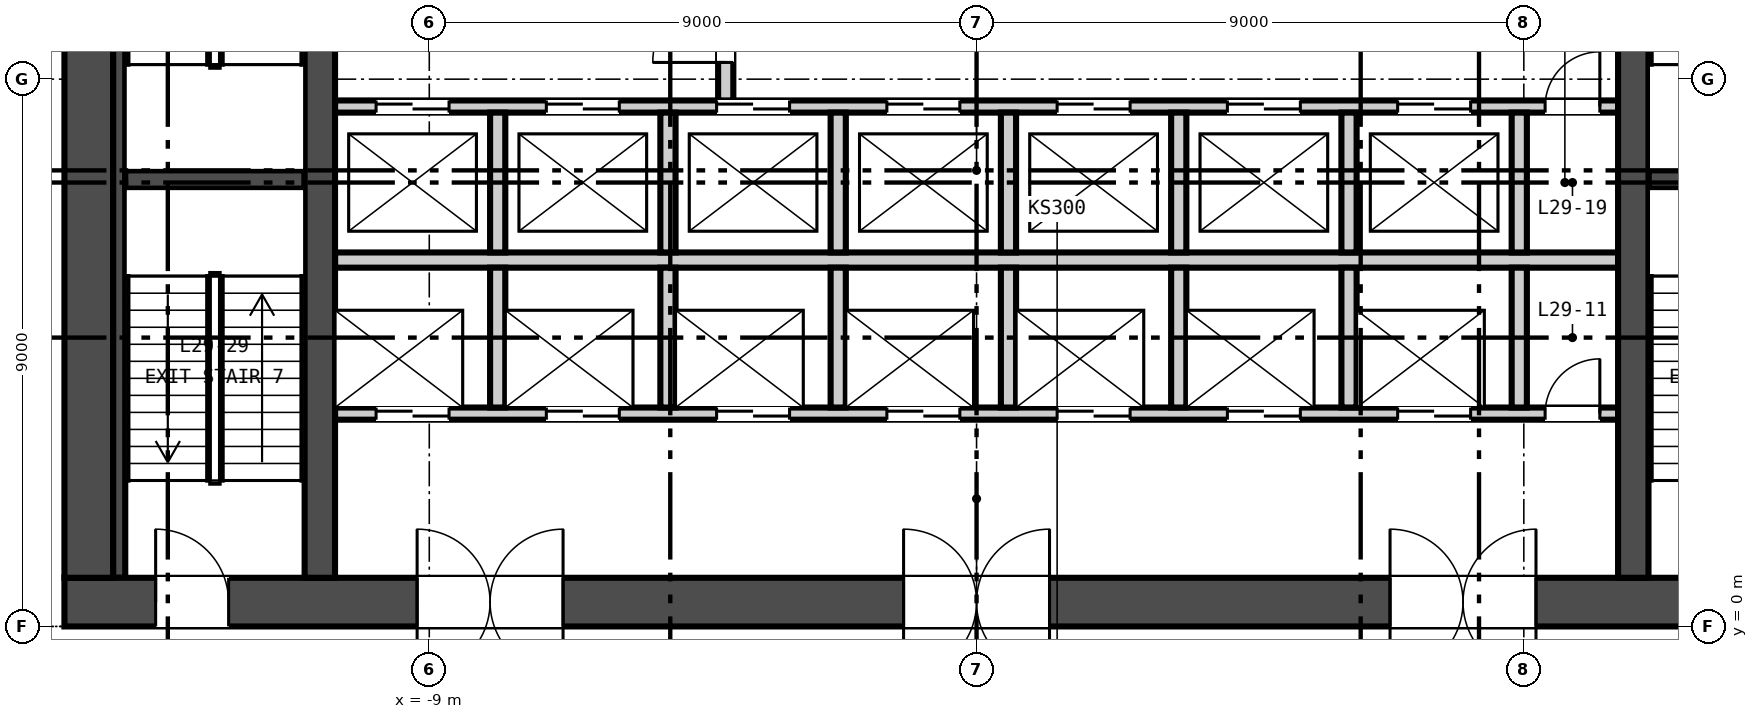
"""IFC4 building model, lengths in metres.
Left out: names, types, materials, properties, quantities, classifications, styles, units other than length and angle.
Written with IfcOpenShell. Run it as: python <this file> out.ifc"""

import sys

from ifc_helpers import new_model, si_unit, direction, frame, frame_2d, origin, place, context, subcontext, project, spatial, rectangle, extrude, element, fill, save


model = new_model("IFC4")
c1 = context("Model", 3, precision=1e-05, world=origin(), true_north=direction((0.0, 1.0)))
c2 = subcontext(c1, "Body", "Model", "MODEL_VIEW")
j1 = project(units=[si_unit("LENGTHUNIT", "METRE"), si_unit("PLANEANGLEUNIT", "RADIAN")], contexts=[c1])
p1 = place(None, origin())
s1 = spatial("IfcSite", under=j1, at=p1, CompositionType="ELEMENT")
p2 = place(p1, origin())
s2 = spatial("IfcBuilding", under=s1, at=p2, CompositionType="ELEMENT")
p3 = place(p2, frame((0.0, 0.0, 121.65)))
s3 = spatial("IfcBuildingStorey", under=s2, at=p3, CompositionType="ELEMENT", Elevation=121.65)
p4 = place(p3, frame((-15.0, 0.4, -0.3), z_axis=(0.0, 0.0, 1.0), x_axis=(1.0, 0.0, 0.0)))
e1 = element("IfcWall", 1, at=p4, inside=s3, PredefinedType="SOLIDWALL", context=c2, shape_type="SweptSolid", body=[
    extrude(rectangle(XDim=30.0, YDim=0.8, at=frame_2d((15.0, 0.0))), origin(), (0.0, 0.0, 1.0), 4.65),
])
p5 = place(p4, frame((5.8, 0.0, 0.3)))
e2 = element("IfcOpeningElement", 2, at=p5, cuts=e1, PredefinedType="OPENING", context=c2, shape_type="SweptSolid", body=[
    extrude(rectangle(XDim=2.4, YDim=2.4, at=frame_2d((1.2, 1.2))), frame((0.0, 0.41, 0.0), z_axis=(0.0, -1.0, 0.0), x_axis=(1.0, 0.0, 0.0)), (0.0, 0.0, 1.0), 0.82),
])
p6 = place(p4, frame((13.8, 0.0, 0.3)))
e3 = element("IfcOpeningElement", 3, at=p6, cuts=e1, PredefinedType="OPENING", context=c2, shape_type="SweptSolid", body=[
    extrude(rectangle(XDim=2.4, YDim=2.4, at=frame_2d((1.2, 1.2))), frame((0.0, 0.41, 0.0), z_axis=(0.0, -1.0, 0.0), x_axis=(1.0, 0.0, 0.0)), (0.0, 0.0, 1.0), 0.82),
])
p7 = place(p4, frame((21.8, 0.0, 0.3)))
e4 = element("IfcOpeningElement", 4, at=p7, cuts=e1, PredefinedType="OPENING", context=c2, shape_type="SweptSolid", body=[
    extrude(rectangle(XDim=2.4, YDim=2.4, at=frame_2d((1.2, 1.2))), frame((0.0, 0.41, 0.0), z_axis=(0.0, -1.0, 0.0), x_axis=(1.0, 0.0, 0.0)), (0.0, 0.0, 1.0), 0.82),
])
p8 = place(p4, frame((1.5, 0.0, 0.3)))
e5 = element("IfcOpeningElement", 5, at=p8, cuts=e1, PredefinedType="OPENING", context=c2, shape_type="SweptSolid", body=[
    extrude(rectangle(XDim=1.2, YDim=2.1, at=frame_2d((0.6, 1.05))), frame((0.0, 0.41, 0.0), z_axis=(0.0, -1.0, 0.0), x_axis=(1.0, 0.0, 0.0)), (0.0, 0.0, 1.0), 0.82),
])
p9 = place(p4, frame((27.3, 0.0, 0.3)))
e6 = element("IfcOpeningElement", 6, at=p9, cuts=e1, PredefinedType="OPENING", context=c2, shape_type="SweptSolid", body=[
    extrude(rectangle(XDim=1.2, YDim=2.1, at=frame_2d((0.6, 1.05))), frame((0.0, 0.41, 0.0), z_axis=(0.0, -1.0, 0.0), x_axis=(1.0, 0.0, 0.0)), (0.0, 0.0, 1.0), 0.82),
])
p10 = place(p3, frame((-14.6, 0.8, -0.3), z_axis=(0.0, 0.0, 1.0), x_axis=(0.0, 1.0, 0.0)))
e7 = element("IfcWall", 7, at=p10, inside=s3, PredefinedType="SOLIDWALL", context=c2, shape_type="SweptSolid", body=[
    extrude(rectangle(XDim=13.4, YDim=0.8, at=frame_2d((6.7, 0.0))), origin(), (0.0, 0.0, 1.0), 4.65),
])
for number, where, z_axis, x_axis in (
    (8, (-10.8, 0.8, -0.3), (0.0, 0.0, 1.0), (0.0, 1.0, 0.0)),
    (9, (10.8, 0.8, -0.3), (0.0, 0.0, 1.0), (0.0, 1.0, 0.0)),
):
    element("IfcWall", number, at=place(p3, frame(where, z_axis=z_axis, x_axis=x_axis)), inside=s3, PredefinedType="SOLIDWALL", context=c2, shape_type="SweptSolid", body=[
        extrude(rectangle(XDim=13.4, YDim=0.5, at=frame_2d((6.7, 0.0))), origin(), (0.0, 0.0, 1.0), 4.65),
    ])
p11 = place(p3, frame((-10.55, 3.5, 0.0), z_axis=(0.0, 0.0, 1.0), x_axis=(1.0, 0.0, 0.0)))
e10 = element("IfcWall", 10, at=p11, inside=s3, PredefinedType="PARTITIONING", context=c2, shape_type="SweptSolid", body=[
    extrude(rectangle(XDim=21.1, YDim=0.2, at=frame_2d((10.55, 0.0))), origin(), (0.0, 0.0, 1.0), 4.35),
])
p12 = place(p11, frame((0.675, 0.0, 0.0)))
e11 = element("IfcOpeningElement", 11, at=p12, cuts=e10, PredefinedType="OPENING", context=c2, shape_type="SweptSolid", body=[
    extrude(rectangle(XDim=1.2, YDim=2.1, at=frame_2d((0.6, 1.05))), frame((0.0, 0.11, 0.0), z_axis=(0.0, -1.0, 0.0), x_axis=(1.0, 0.0, 0.0)), (0.0, 0.0, 1.0), 0.22),
])
p13 = place(p11, frame((3.475, 0.0, 0.0)))
e12 = element("IfcOpeningElement", 12, at=p13, cuts=e10, PredefinedType="OPENING", context=c2, shape_type="SweptSolid", body=[
    extrude(rectangle(XDim=1.2, YDim=2.1, at=frame_2d((0.6, 1.05))), frame((0.0, 0.11, 0.0), z_axis=(0.0, -1.0, 0.0), x_axis=(1.0, 0.0, 0.0)), (0.0, 0.0, 1.0), 0.22),
])
p14 = place(p11, frame((6.275, 0.0, 0.0)))
e13 = element("IfcOpeningElement", 13, at=p14, cuts=e10, PredefinedType="OPENING", context=c2, shape_type="SweptSolid", body=[
    extrude(rectangle(XDim=1.2, YDim=2.1, at=frame_2d((0.6, 1.05))), frame((0.0, 0.11, 0.0), z_axis=(0.0, -1.0, 0.0), x_axis=(1.0, 0.0, 0.0)), (0.0, 0.0, 1.0), 0.22),
])
p15 = place(p11, frame((9.075, 0.0, 0.0)))
e14 = element("IfcOpeningElement", 14, at=p15, cuts=e10, PredefinedType="OPENING", context=c2, shape_type="SweptSolid", body=[
    extrude(rectangle(XDim=1.2, YDim=2.1, at=frame_2d((0.6, 1.05))), frame((0.0, 0.11, 0.0), z_axis=(0.0, -1.0, 0.0), x_axis=(1.0, 0.0, 0.0)), (0.0, 0.0, 1.0), 0.22),
])
p16 = place(p11, frame((11.875, 0.0, 0.0)))
e15 = element("IfcOpeningElement", 15, at=p16, cuts=e10, PredefinedType="OPENING", context=c2, shape_type="SweptSolid", body=[
    extrude(rectangle(XDim=1.2, YDim=2.1, at=frame_2d((0.6, 1.05))), frame((0.0, 0.11, 0.0), z_axis=(0.0, -1.0, 0.0), x_axis=(1.0, 0.0, 0.0)), (0.0, 0.0, 1.0), 0.22),
])
p17 = place(p11, frame((14.675, 0.0, 0.0)))
e16 = element("IfcOpeningElement", 16, at=p17, cuts=e10, PredefinedType="OPENING", context=c2, shape_type="SweptSolid", body=[
    extrude(rectangle(XDim=1.2, YDim=2.1, at=frame_2d((0.6, 1.05))), frame((0.0, 0.11, 0.0), z_axis=(0.0, -1.0, 0.0), x_axis=(1.0, 0.0, 0.0)), (0.0, 0.0, 1.0), 0.22),
])
p18 = place(p11, frame((17.475, 0.0, 0.0)))
e17 = element("IfcOpeningElement", 17, at=p18, cuts=e10, PredefinedType="OPENING", context=c2, shape_type="SweptSolid", body=[
    extrude(rectangle(XDim=1.2, YDim=2.1, at=frame_2d((0.6, 1.05))), frame((0.0, 0.11, 0.0), z_axis=(0.0, -1.0, 0.0), x_axis=(1.0, 0.0, 0.0)), (0.0, 0.0, 1.0), 0.22),
])
p19 = place(p11, frame((19.9, 0.0, 0.0)))
e18 = element("IfcOpeningElement", 18, at=p19, cuts=e10, PredefinedType="OPENING", context=c2, shape_type="SweptSolid", body=[
    extrude(rectangle(XDim=0.9, YDim=2.1, at=frame_2d((0.45, 1.05))), frame((0.0, 0.11, 0.0), z_axis=(0.0, -1.0, 0.0), x_axis=(1.0, 0.0, 0.0)), (0.0, 0.0, 1.0), 0.22),
])
p20 = place(p3, frame((-10.55, 6.025, 0.0), z_axis=(0.0, 0.0, 1.0), x_axis=(1.0, 0.0, 0.0)))
e19 = element("IfcWall", 19, at=p20, inside=s3, PredefinedType="PARTITIONING", context=c2, shape_type="SweptSolid", body=[
    extrude(rectangle(XDim=21.1, YDim=0.25, at=frame_2d((10.55, 0.0))), origin(), (0.0, 0.0, 1.0), 4.35),
])
p21 = place(p3, frame((-10.55, 8.55, 0.0), z_axis=(0.0, 0.0, 1.0), x_axis=(1.0, 0.0, 0.0)))
e20 = element("IfcWall", 20, at=p21, inside=s3, PredefinedType="PARTITIONING", context=c2, shape_type="SweptSolid", body=[
    extrude(rectangle(XDim=21.1, YDim=0.2, at=frame_2d((10.55, 0.0))), origin(), (0.0, 0.0, 1.0), 4.35),
])
p22 = place(p21, frame((0.675, 0.0, 0.0)))
e21 = element("IfcOpeningElement", 21, at=p22, cuts=e20, PredefinedType="OPENING", context=c2, shape_type="SweptSolid", body=[
    extrude(rectangle(XDim=1.2, YDim=2.1, at=frame_2d((0.6, 1.05))), frame((0.0, 0.11, 0.0), z_axis=(0.0, -1.0, 0.0), x_axis=(1.0, 0.0, 0.0)), (0.0, 0.0, 1.0), 0.22),
])
p23 = place(p21, frame((3.475, 0.0, 0.0)))
e22 = element("IfcOpeningElement", 22, at=p23, cuts=e20, PredefinedType="OPENING", context=c2, shape_type="SweptSolid", body=[
    extrude(rectangle(XDim=1.2, YDim=2.1, at=frame_2d((0.6, 1.05))), frame((0.0, 0.11, 0.0), z_axis=(0.0, -1.0, 0.0), x_axis=(1.0, 0.0, 0.0)), (0.0, 0.0, 1.0), 0.22),
])
p24 = place(p21, frame((6.275, 0.0, 0.0)))
e23 = element("IfcOpeningElement", 23, at=p24, cuts=e20, PredefinedType="OPENING", context=c2, shape_type="SweptSolid", body=[
    extrude(rectangle(XDim=1.2, YDim=2.1, at=frame_2d((0.6, 1.05))), frame((0.0, 0.11, 0.0), z_axis=(0.0, -1.0, 0.0), x_axis=(1.0, 0.0, 0.0)), (0.0, 0.0, 1.0), 0.22),
])
p25 = place(p21, frame((9.075, 0.0, 0.0)))
e24 = element("IfcOpeningElement", 24, at=p25, cuts=e20, PredefinedType="OPENING", context=c2, shape_type="SweptSolid", body=[
    extrude(rectangle(XDim=1.2, YDim=2.1, at=frame_2d((0.6, 1.05))), frame((0.0, 0.11, 0.0), z_axis=(0.0, -1.0, 0.0), x_axis=(1.0, 0.0, 0.0)), (0.0, 0.0, 1.0), 0.22),
])
p26 = place(p21, frame((11.875, 0.0, 0.0)))
e25 = element("IfcOpeningElement", 25, at=p26, cuts=e20, PredefinedType="OPENING", context=c2, shape_type="SweptSolid", body=[
    extrude(rectangle(XDim=1.2, YDim=2.1, at=frame_2d((0.6, 1.05))), frame((0.0, 0.11, 0.0), z_axis=(0.0, -1.0, 0.0), x_axis=(1.0, 0.0, 0.0)), (0.0, 0.0, 1.0), 0.22),
])
p27 = place(p21, frame((14.675, 0.0, 0.0)))
e26 = element("IfcOpeningElement", 26, at=p27, cuts=e20, PredefinedType="OPENING", context=c2, shape_type="SweptSolid", body=[
    extrude(rectangle(XDim=1.2, YDim=2.1, at=frame_2d((0.6, 1.05))), frame((0.0, 0.11, 0.0), z_axis=(0.0, -1.0, 0.0), x_axis=(1.0, 0.0, 0.0)), (0.0, 0.0, 1.0), 0.22),
])
p28 = place(p21, frame((17.475, 0.0, 0.0)))
e27 = element("IfcOpeningElement", 27, at=p28, cuts=e20, PredefinedType="OPENING", context=c2, shape_type="SweptSolid", body=[
    extrude(rectangle(XDim=1.2, YDim=2.1, at=frame_2d((0.6, 1.05))), frame((0.0, 0.11, 0.0), z_axis=(0.0, -1.0, 0.0), x_axis=(1.0, 0.0, 0.0)), (0.0, 0.0, 1.0), 0.22),
])
p29 = place(p21, frame((19.9, 0.0, 0.0)))
e28 = element("IfcOpeningElement", 28, at=p29, cuts=e20, PredefinedType="OPENING", context=c2, shape_type="SweptSolid", body=[
    extrude(rectangle(XDim=0.9, YDim=2.1, at=frame_2d((0.45, 1.05))), frame((0.0, 0.11, 0.0), z_axis=(0.0, -1.0, 0.0), x_axis=(1.0, 0.0, 0.0)), (0.0, 0.0, 1.0), 0.22),
])
p30 = place(p3, frame((-4.125, 8.65, 0.0), z_axis=(0.0, 0.0, 1.0), x_axis=(0.0, 1.0, 0.0)))
e29 = element("IfcWall", 29, at=p30, inside=s3, PredefinedType="PARTITIONING", context=c2, shape_type="SweptSolid", body=[
    extrude(rectangle(XDim=2.45, YDim=0.25, at=frame_2d((1.225, 0.0))), origin(), (0.0, 0.0, 1.0), 4.35),
])
p31 = place(p30, frame((0.625, 0.0, 0.0)))
e30 = element("IfcOpeningElement", 30, at=p31, cuts=e29, PredefinedType="OPENING", context=c2, shape_type="SweptSolid", body=[
    extrude(rectangle(XDim=1.2, YDim=2.1, at=frame_2d((0.6, 1.05))), frame((0.0, 0.135, 0.0), z_axis=(0.0, -1.0, 0.0), x_axis=(1.0, 0.0, 0.0)), (0.0, 0.0, 1.0), 0.27),
])
for number, where, z_axis, x_axis in (
    (31, (-7.875, 3.6, 0.0), (0.0, 0.0, 1.0), (0.0, 1.0, 0.0)),
    (32, (-5.075, 3.6, 0.0), (0.0, 0.0, 1.0), (0.0, 1.0, 0.0)),
    (33, (-2.275, 3.6, 0.0), (0.0, 0.0, 1.0), (0.0, 1.0, 0.0)),
    (34, (0.525, 3.6, 0.0), (0.0, 0.0, 1.0), (0.0, 1.0, 0.0)),
    (35, (3.325, 3.6, 0.0), (0.0, 0.0, 1.0), (0.0, 1.0, 0.0)),
    (36, (6.125, 3.6, 0.0), (0.0, 0.0, 1.0), (0.0, 1.0, 0.0)),
    (37, (8.925, 3.6, 0.0), (0.0, 0.0, 1.0), (0.0, 1.0, 0.0)),
):
    element("IfcWall", number, at=place(p3, frame(where, z_axis=z_axis, x_axis=x_axis)), inside=s3, PredefinedType="PARTITIONING", context=c2, shape_type="SweptSolid", body=[
        extrude(rectangle(XDim=2.3, YDim=0.25, at=frame_2d((1.15, 0.0))), origin(), (0.0, 0.0, 1.0), 4.35),
    ])
for number, where, z_axis, x_axis in (
    (38, (-7.875, 6.15, 0.0), (0.0, 0.0, 1.0), (0.0, 1.0, 0.0)),
    (39, (-5.075, 6.15, 0.0), (0.0, 0.0, 1.0), (0.0, 1.0, 0.0)),
    (40, (-2.275, 6.15, 0.0), (0.0, 0.0, 1.0), (0.0, 1.0, 0.0)),
    (41, (0.525, 6.15, 0.0), (0.0, 0.0, 1.0), (0.0, 1.0, 0.0)),
    (42, (3.325, 6.15, 0.0), (0.0, 0.0, 1.0), (0.0, 1.0, 0.0)),
    (43, (6.125, 6.15, 0.0), (0.0, 0.0, 1.0), (0.0, 1.0, 0.0)),
    (44, (8.925, 6.15, 0.0), (0.0, 0.0, 1.0), (0.0, 1.0, 0.0)),
):
    element("IfcWall", number, at=place(p3, frame(where, z_axis=z_axis, x_axis=x_axis)), inside=s3, PredefinedType="PARTITIONING", context=c2, shape_type="SweptSolid", body=[
        extrude(rectangle(XDim=2.3, YDim=0.25, at=frame_2d((1.15, 0.0))), origin(), (0.0, 0.0, 1.0), 4.35),
    ])
p32 = place(p3, frame((-14.0, 7.35, 0.0), z_axis=(0.0, 0.0, 1.0), x_axis=(1.0, 0.0, 0.0)))
e45 = element("IfcWall", 45, at=p32, inside=s3, PredefinedType="SOLIDWALL", context=c2, shape_type="SweptSolid", body=[
    extrude(rectangle(XDim=2.95, YDim=0.3, at=frame_2d((1.475, 0.0))), origin(), (0.0, 0.0, 1.0), 4.35),
])
p33 = place(p3, frame((-14.1, 0.8, 0.0), z_axis=(0.0, 0.0, 1.0), x_axis=(0.0, 1.0, 0.0)))
e46 = element("IfcWall", 46, at=p33, inside=s3, PredefinedType="SOLIDWALL", context=c2, shape_type="SweptSolid", body=[
    extrude(rectangle(XDim=13.4, YDim=0.2, at=frame_2d((6.7, 0.0))), origin(), (0.0, 0.0, 1.0), 4.35),
])
p34 = place(p3, frame((11.05, 7.35, 0.0), z_axis=(0.0, 0.0, 1.0), x_axis=(1.0, 0.0, 0.0)))
e47 = element("IfcWall", 47, at=p34, inside=s3, PredefinedType="SOLIDWALL", context=c2, shape_type="SweptSolid", body=[
    extrude(rectangle(XDim=2.95, YDim=0.3, at=frame_2d((1.475, 0.0))), origin(), (0.0, 0.0, 1.0), 4.35),
])
p35 = place(p31, origin())
e48 = element("IfcDoor", 48, at=p35, inside=s3, OperationType="SINGLE_SWING_LEFT", PredefinedType="DOOR", context=c2, shape_type="SweptSolid", body=[
    extrude(rectangle(XDim=1.2, YDim=2.1, at=frame_2d((0.6, 1.05))), frame((0.0, 0.025, 0.0), z_axis=(0.0, -1.0, 0.0), x_axis=(1.0, 0.0, 0.0)), (0.0, 0.0, 1.0), 0.05),
])
fill(e30, e48)
p36 = place(p12, origin())
e49 = element("IfcDoor", 49, at=p36, inside=s3, OperationType="DOUBLE_DOOR_SLIDING", PredefinedType="DOOR", context=c2, shape_type="SweptSolid", body=[
    extrude(rectangle(XDim=1.2, YDim=2.1, at=frame_2d((0.6, 1.05))), frame((0.0, 0.025, 0.0), z_axis=(0.0, -1.0, 0.0), x_axis=(1.0, 0.0, 0.0)), (0.0, 0.0, 1.0), 0.05),
])
fill(e11, e49)
p37 = place(p13, origin())
e50 = element("IfcDoor", 50, at=p37, inside=s3, OperationType="DOUBLE_DOOR_SLIDING", PredefinedType="DOOR", context=c2, shape_type="SweptSolid", body=[
    extrude(rectangle(XDim=1.2, YDim=2.1, at=frame_2d((0.6, 1.05))), frame((0.0, 0.025, 0.0), z_axis=(0.0, -1.0, 0.0), x_axis=(1.0, 0.0, 0.0)), (0.0, 0.0, 1.0), 0.05),
])
fill(e12, e50)
p38 = place(p14, origin())
e51 = element("IfcDoor", 51, at=p38, inside=s3, OperationType="DOUBLE_DOOR_SLIDING", PredefinedType="DOOR", context=c2, shape_type="SweptSolid", body=[
    extrude(rectangle(XDim=1.2, YDim=2.1, at=frame_2d((0.6, 1.05))), frame((0.0, 0.025, 0.0), z_axis=(0.0, -1.0, 0.0), x_axis=(1.0, 0.0, 0.0)), (0.0, 0.0, 1.0), 0.05),
])
fill(e13, e51)
p39 = place(p15, origin())
e52 = element("IfcDoor", 52, at=p39, inside=s3, OperationType="DOUBLE_DOOR_SLIDING", PredefinedType="DOOR", context=c2, shape_type="SweptSolid", body=[
    extrude(rectangle(XDim=1.2, YDim=2.1, at=frame_2d((0.6, 1.05))), frame((0.0, 0.025, 0.0), z_axis=(0.0, -1.0, 0.0), x_axis=(1.0, 0.0, 0.0)), (0.0, 0.0, 1.0), 0.05),
])
fill(e14, e52)
p40 = place(p16, origin())
e53 = element("IfcDoor", 53, at=p40, inside=s3, OperationType="DOUBLE_DOOR_SLIDING", PredefinedType="DOOR", context=c2, shape_type="SweptSolid", body=[
    extrude(rectangle(XDim=1.2, YDim=2.1, at=frame_2d((0.6, 1.05))), frame((0.0, 0.025, 0.0), z_axis=(0.0, -1.0, 0.0), x_axis=(1.0, 0.0, 0.0)), (0.0, 0.0, 1.0), 0.05),
])
fill(e15, e53)
p41 = place(p17, origin())
e54 = element("IfcDoor", 54, at=p41, inside=s3, OperationType="DOUBLE_DOOR_SLIDING", PredefinedType="DOOR", context=c2, shape_type="SweptSolid", body=[
    extrude(rectangle(XDim=1.2, YDim=2.1, at=frame_2d((0.6, 1.05))), frame((0.0, 0.025, 0.0), z_axis=(0.0, -1.0, 0.0), x_axis=(1.0, 0.0, 0.0)), (0.0, 0.0, 1.0), 0.05),
])
fill(e16, e54)
p42 = place(p18, origin())
e55 = element("IfcDoor", 55, at=p42, inside=s3, OperationType="DOUBLE_DOOR_SLIDING", PredefinedType="DOOR", context=c2, shape_type="SweptSolid", body=[
    extrude(rectangle(XDim=1.2, YDim=2.1, at=frame_2d((0.6, 1.05))), frame((0.0, 0.025, 0.0), z_axis=(0.0, -1.0, 0.0), x_axis=(1.0, 0.0, 0.0)), (0.0, 0.0, 1.0), 0.05),
])
fill(e17, e55)
p43 = place(p19, origin())
e56 = element("IfcDoor", 56, at=p43, inside=s3, OperationType="SINGLE_SWING_RIGHT", PredefinedType="DOOR", context=c2, shape_type="SweptSolid", body=[
    extrude(rectangle(XDim=0.9, YDim=2.1, at=frame_2d((0.45, 1.05))), frame((0.0, 0.025, 0.0), z_axis=(0.0, -1.0, 0.0), x_axis=(1.0, 0.0, 0.0)), (0.0, 0.0, 1.0), 0.05),
])
fill(e18, e56)
p44 = place(p22, origin())
e57 = element("IfcDoor", 57, at=p44, inside=s3, OperationType="DOUBLE_DOOR_SLIDING", PredefinedType="DOOR", context=c2, shape_type="SweptSolid", body=[
    extrude(rectangle(XDim=1.2, YDim=2.1, at=frame_2d((0.6, 1.05))), frame((0.0, 0.025, 0.0), z_axis=(0.0, -1.0, 0.0), x_axis=(1.0, 0.0, 0.0)), (0.0, 0.0, 1.0), 0.05),
])
fill(e21, e57)
p45 = place(p23, origin())
e58 = element("IfcDoor", 58, at=p45, inside=s3, OperationType="DOUBLE_DOOR_SLIDING", PredefinedType="DOOR", context=c2, shape_type="SweptSolid", body=[
    extrude(rectangle(XDim=1.2, YDim=2.1, at=frame_2d((0.6, 1.05))), frame((0.0, 0.025, 0.0), z_axis=(0.0, -1.0, 0.0), x_axis=(1.0, 0.0, 0.0)), (0.0, 0.0, 1.0), 0.05),
])
fill(e22, e58)
p46 = place(p24, origin())
e59 = element("IfcDoor", 59, at=p46, inside=s3, OperationType="DOUBLE_DOOR_SLIDING", PredefinedType="DOOR", context=c2, shape_type="SweptSolid", body=[
    extrude(rectangle(XDim=1.2, YDim=2.1, at=frame_2d((0.6, 1.05))), frame((0.0, 0.025, 0.0), z_axis=(0.0, -1.0, 0.0), x_axis=(1.0, 0.0, 0.0)), (0.0, 0.0, 1.0), 0.05),
])
fill(e23, e59)
p47 = place(p25, origin())
e60 = element("IfcDoor", 60, at=p47, inside=s3, OperationType="DOUBLE_DOOR_SLIDING", PredefinedType="DOOR", context=c2, shape_type="SweptSolid", body=[
    extrude(rectangle(XDim=1.2, YDim=2.1, at=frame_2d((0.6, 1.05))), frame((0.0, 0.025, 0.0), z_axis=(0.0, -1.0, 0.0), x_axis=(1.0, 0.0, 0.0)), (0.0, 0.0, 1.0), 0.05),
])
fill(e24, e60)
p48 = place(p26, origin())
e61 = element("IfcDoor", 61, at=p48, inside=s3, OperationType="DOUBLE_DOOR_SLIDING", PredefinedType="DOOR", context=c2, shape_type="SweptSolid", body=[
    extrude(rectangle(XDim=1.2, YDim=2.1, at=frame_2d((0.6, 1.05))), frame((0.0, 0.025, 0.0), z_axis=(0.0, -1.0, 0.0), x_axis=(1.0, 0.0, 0.0)), (0.0, 0.0, 1.0), 0.05),
])
fill(e25, e61)
p49 = place(p27, origin())
e62 = element("IfcDoor", 62, at=p49, inside=s3, OperationType="DOUBLE_DOOR_SLIDING", PredefinedType="DOOR", context=c2, shape_type="SweptSolid", body=[
    extrude(rectangle(XDim=1.2, YDim=2.1, at=frame_2d((0.6, 1.05))), frame((0.0, 0.025, 0.0), z_axis=(0.0, -1.0, 0.0), x_axis=(1.0, 0.0, 0.0)), (0.0, 0.0, 1.0), 0.05),
])
fill(e26, e62)
p50 = place(p28, origin())
e63 = element("IfcDoor", 63, at=p50, inside=s3, OperationType="DOUBLE_DOOR_SLIDING", PredefinedType="DOOR", context=c2, shape_type="SweptSolid", body=[
    extrude(rectangle(XDim=1.2, YDim=2.1, at=frame_2d((0.6, 1.05))), frame((0.0, 0.025, 0.0), z_axis=(0.0, -1.0, 0.0), x_axis=(1.0, 0.0, 0.0)), (0.0, 0.0, 1.0), 0.05),
])
fill(e27, e63)
p51 = place(p29, origin())
e64 = element("IfcDoor", 64, at=p51, inside=s3, OperationType="SINGLE_SWING_RIGHT", PredefinedType="DOOR", context=c2, shape_type="SweptSolid", body=[
    extrude(rectangle(XDim=0.9, YDim=2.1, at=frame_2d((0.45, 1.05))), frame((0.0, 0.025, 0.0), z_axis=(0.0, -1.0, 0.0), x_axis=(1.0, 0.0, 0.0)), (0.0, 0.0, 1.0), 0.05),
])
fill(e28, e64)
p52 = place(p5, origin())
e65 = element("IfcDoor", 65, at=p52, inside=s3, OperationType="DOUBLE_DOOR_DOUBLE_SWING", PredefinedType="DOOR", context=c2, shape_type="SweptSolid", body=[
    extrude(rectangle(XDim=2.4, YDim=2.4, at=frame_2d((1.2, 1.2))), frame((0.0, 0.025, 0.0), z_axis=(0.0, -1.0, 0.0), x_axis=(1.0, 0.0, 0.0)), (0.0, 0.0, 1.0), 0.05),
])
fill(e2, e65)
p53 = place(p6, origin())
e66 = element("IfcDoor", 66, at=p53, inside=s3, OperationType="DOUBLE_DOOR_DOUBLE_SWING", PredefinedType="DOOR", context=c2, shape_type="SweptSolid", body=[
    extrude(rectangle(XDim=2.4, YDim=2.4, at=frame_2d((1.2, 1.2))), frame((0.0, 0.025, 0.0), z_axis=(0.0, -1.0, 0.0), x_axis=(1.0, 0.0, 0.0)), (0.0, 0.0, 1.0), 0.05),
])
fill(e3, e66)
p54 = place(p7, origin())
e67 = element("IfcDoor", 67, at=p54, inside=s3, OperationType="DOUBLE_DOOR_DOUBLE_SWING", PredefinedType="DOOR", context=c2, shape_type="SweptSolid", body=[
    extrude(rectangle(XDim=2.4, YDim=2.4, at=frame_2d((1.2, 1.2))), frame((0.0, 0.025, 0.0), z_axis=(0.0, -1.0, 0.0), x_axis=(1.0, 0.0, 0.0)), (0.0, 0.0, 1.0), 0.05),
])
fill(e4, e67)
p55 = place(p8, origin())
e68 = element("IfcDoor", 68, at=p55, inside=s3, OperationType="SINGLE_SWING_LEFT", PredefinedType="DOOR", context=c2, shape_type="SweptSolid", body=[
    extrude(rectangle(XDim=1.2, YDim=2.1, at=frame_2d((0.6, 1.05))), frame((0.0, 0.025, 0.0), z_axis=(0.0, -1.0, 0.0), x_axis=(1.0, 0.0, 0.0)), (0.0, 0.0, 1.0), 0.05),
])
fill(e5, e68)
save(model, sys.argv[1])
